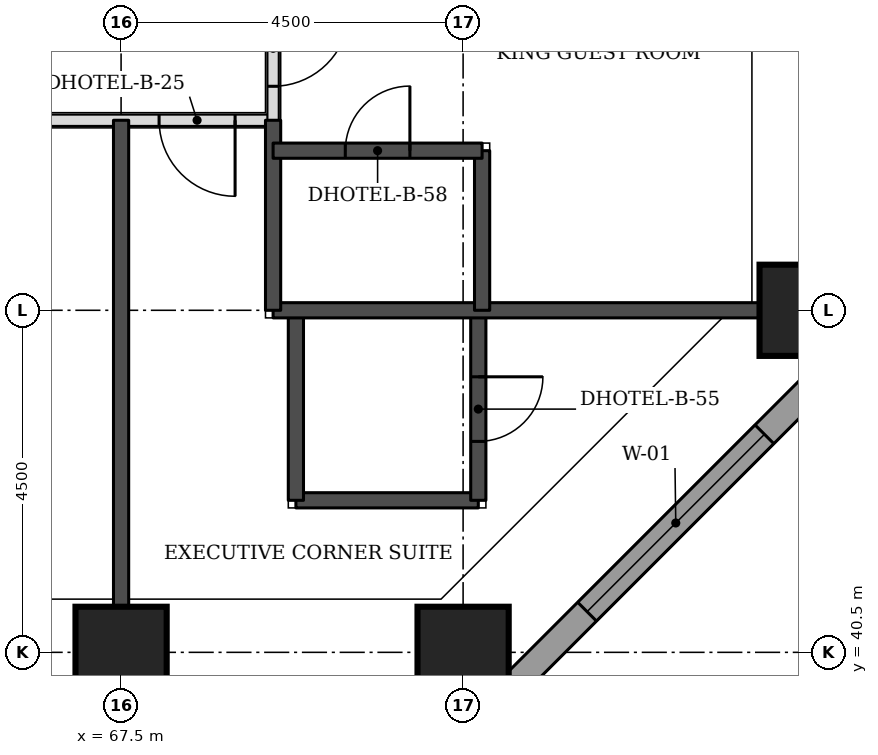
"""IFC4 building model, lengths in metres.
Left out: names, types, materials, properties, quantities, classifications, styles, units other than length and angle.
Written with IfcOpenShell. Run it as: python <this file> out.ifc"""

import sys

from ifc_helpers import new_model, si_unit, direction, frame, frame_2d, origin, origin_2d, place, context, subcontext, project, spatial, rectangle, extrude, element, fill, save


model = new_model("IFC4")
c1 = context("Model", 3, precision=1e-05, world=origin(), true_north=direction((0.0, 1.0)))
c2 = subcontext(c1, "Body", "Model", "MODEL_VIEW")
j1 = project(units=[si_unit("LENGTHUNIT", "METRE"), si_unit("PLANEANGLEUNIT", "RADIAN")], contexts=[c1])
p1 = place(None, origin())
s1 = spatial("IfcSite", under=j1, at=p1, CompositionType="ELEMENT")
p2 = place(p1, origin())
s2 = spatial("IfcBuilding", under=s1, at=p2, CompositionType="ELEMENT")
p3 = place(p2, frame((0.0, 0.0, 29.7)))
s3 = spatial("IfcBuildingStorey", under=s2, at=p3, CompositionType="ELEMENT", Elevation=29.7)
for number, where, z_axis, x_axis in (
    (1, (67.5, 40.5, 0.0), (0.0, 0.0, 1.0), (1.0, 0.0, 0.0)),
    (2, (72.0, 40.5, 0.0), (0.0, 0.0, 1.0), (1.0, 0.0, 0.0)),
    (3, (76.5, 45.0, 0.0), (0.0, 0.0, 1.0), (1.0, 0.0, 0.0)),
):
    element("IfcColumn", number, at=place(p3, frame(where, z_axis=z_axis, x_axis=x_axis)), inside=s3, PredefinedType="COLUMN", context=c2, shape_type="SweptSolid", body=[
        extrude(rectangle(XDim=1.2, YDim=1.2, at=origin_2d()), origin(), (0.0, 0.0, 1.0), 3.3),
    ])
p4 = place(p3, frame((72.27, 39.674, 0.0), z_axis=(0.0, 0.0, 1.0), x_axis=(0.707106781187, 0.707106781187, 0.0)))
e4 = element("IfcWall", 4, at=p4, inside=s3, PredefinedType="STANDARD", context=c2, shape_type="SweptSolid", body=[
    extrude(rectangle(XDim=7.151, YDim=0.35, at=frame_2d((3.576, 0.0))), origin(), (0.0, 0.0, 1.0), 3.055),
])
p5 = place(p4, frame((1.926, 0.0, 0.8)))
e5 = element("IfcOpeningElement", 5, at=p5, cuts=e4, PredefinedType="OPENING", context=c2, shape_type="SweptSolid", body=[
    extrude(rectangle(XDim=3.3, YDim=1.5, at=frame_2d((1.65, 0.75))), frame((0.0, 0.185, 0.0), z_axis=(0.0, -1.0, 0.0), x_axis=(1.0, 0.0, 0.0)), (0.0, 0.0, 1.0), 0.37),
])
p6 = place(p3, frame((52.85, 47.5, 0.0), z_axis=(0.0, 0.0, 1.0), x_axis=(1.0, 0.0, 0.0)))
e6 = element("IfcWall", 6, at=p6, inside=s3, PredefinedType="PARTITIONING", context=c2, shape_type="SweptSolid", body=[
    extrude(rectangle(XDim=16.65, YDim=0.15, at=frame_2d((8.325, 0.0))), origin(), (0.0, 0.0, 1.0), 3.08),
])
p7 = place(p6, frame((11.3, 0.0, 0.0)))
e7 = element("IfcOpeningElement", 7, at=p7, cuts=e6, PredefinedType="OPENING", context=c2, shape_type="SweptSolid", body=[
    extrude(rectangle(XDim=1.1, YDim=2.1, at=frame_2d((0.55, 1.05))), frame((0.0, 0.085, 0.0), z_axis=(0.0, -1.0, 0.0), x_axis=(1.0, 0.0, 0.0)), (0.0, 0.0, 1.0), 0.17),
])
p8 = place(p6, frame((15.15, 0.0, 0.0)))
e8 = element("IfcOpeningElement", 8, at=p8, cuts=e6, PredefinedType="OPENING", context=c2, shape_type="SweptSolid", body=[
    extrude(rectangle(XDim=1.0, YDim=2.1, at=frame_2d((0.5, 1.05))), frame((0.0, 0.085, 0.0), z_axis=(0.0, -1.0, 0.0), x_axis=(1.0, 0.0, 0.0)), (0.0, 0.0, 1.0), 0.17),
])
p9 = place(p3, frame((69.5, 47.5, 0.0), z_axis=(0.0, 0.0, 1.0), x_axis=(0.0, 1.0, 0.0)))
e9 = element("IfcWall", 9, at=p9, inside=s3, PredefinedType="PARTITIONING", context=c2, shape_type="SweptSolid", body=[
    extrude(rectangle(XDim=26.5, YDim=0.15, at=frame_2d((13.25, 0.0))), origin(), (0.0, 0.0, 1.0), 3.08),
])
p10 = place(p9, frame((24.95, 0.0, 0.0)))
e10 = element("IfcOpeningElement", 10, at=p10, cuts=e9, PredefinedType="OPENING", context=c2, shape_type="SweptSolid", body=[
    extrude(rectangle(XDim=1.0, YDim=2.1, at=frame_2d((0.5, 1.05))), frame((0.0, 0.085, 0.0), z_axis=(0.0, -1.0, 0.0), x_axis=(1.0, 0.0, 0.0)), (0.0, 0.0, 1.0), 0.17),
])
p11 = place(p9, frame((20.7, 0.0, 0.0)))
e11 = element("IfcOpeningElement", 11, at=p11, cuts=e9, PredefinedType="OPENING", context=c2, shape_type="SweptSolid", body=[
    extrude(rectangle(XDim=1.0, YDim=2.1, at=frame_2d((0.5, 1.05))), frame((0.0, 0.085, 0.0), z_axis=(0.0, -1.0, 0.0), x_axis=(1.0, 0.0, 0.0)), (0.0, 0.0, 1.0), 0.17),
])
p12 = place(p9, frame((18.55, 0.0, 0.0)))
e12 = element("IfcOpeningElement", 12, at=p12, cuts=e9, PredefinedType="OPENING", context=c2, shape_type="SweptSolid", body=[
    extrude(rectangle(XDim=1.0, YDim=2.1, at=frame_2d((0.5, 1.05))), frame((0.0, 0.085, 0.0), z_axis=(0.0, -1.0, 0.0), x_axis=(1.0, 0.0, 0.0)), (0.0, 0.0, 1.0), 0.17),
])
p13 = place(p9, frame((11.7, 0.0, 0.0)))
e13 = element("IfcOpeningElement", 13, at=p13, cuts=e9, PredefinedType="OPENING", context=c2, shape_type="SweptSolid", body=[
    extrude(rectangle(XDim=1.0, YDim=2.1, at=frame_2d((0.5, 1.05))), frame((0.0, 0.085, 0.0), z_axis=(0.0, -1.0, 0.0), x_axis=(1.0, 0.0, 0.0)), (0.0, 0.0, 1.0), 0.17),
])
p14 = place(p9, frame((7.65, 0.0, 0.0)))
e14 = element("IfcOpeningElement", 14, at=p14, cuts=e9, PredefinedType="OPENING", context=c2, shape_type="SweptSolid", body=[
    extrude(rectangle(XDim=1.1, YDim=2.1, at=frame_2d((0.55, 1.05))), frame((0.0, 0.085, 0.0), z_axis=(0.0, -1.0, 0.0), x_axis=(1.0, 0.0, 0.0)), (0.0, 0.0, 1.0), 0.17),
])
p15 = place(p9, frame((0.447, 0.0, 0.0)))
e15 = element("IfcOpeningElement", 15, at=p15, cuts=e9, PredefinedType="OPENING", context=c2, shape_type="SweptSolid", body=[
    extrude(rectangle(XDim=1.0, YDim=2.1, at=frame_2d((0.5, 1.05))), frame((0.0, 0.085, 0.0), z_axis=(0.0, -1.0, 0.0), x_axis=(1.0, 0.0, 0.0)), (0.0, 0.0, 1.0), 0.17),
])
p16 = place(p3, frame((67.5, 41.1, 0.0), z_axis=(0.0, 0.0, 1.0), x_axis=(0.0, 1.0, 0.0)))
e16 = element("IfcWall", 16, at=p16, inside=s3, PredefinedType="SOLIDWALL", context=c2, shape_type="SweptSolid", body=[
    extrude(rectangle(XDim=6.4, YDim=0.2, at=frame_2d((3.2, 0.0))), origin(), (0.0, 0.0, 1.0), 3.08),
])
p17 = place(p3, frame((69.8, 42.5, 0.0), z_axis=(0.0, 0.0, 1.0), x_axis=(1.0, 0.0, 0.0)))
e17 = element("IfcWall", 17, at=p17, inside=s3, PredefinedType="SOLIDWALL", context=c2, shape_type="SweptSolid", body=[
    extrude(rectangle(XDim=2.4, YDim=0.2, at=frame_2d((1.2, 0.0))), origin(), (0.0, 0.0, 1.0), 3.08),
])
p18 = place(p3, frame((69.8, 42.5, 0.0), z_axis=(0.0, 0.0, 1.0), x_axis=(0.0, 1.0, 0.0)))
e18 = element("IfcWall", 18, at=p18, inside=s3, PredefinedType="SOLIDWALL", context=c2, shape_type="SweptSolid", body=[
    extrude(rectangle(XDim=2.5, YDim=0.2, at=frame_2d((1.25, 0.0))), origin(), (0.0, 0.0, 1.0), 3.08),
])
p19 = place(p3, frame((72.2, 42.5, 0.0), z_axis=(0.0, 0.0, 1.0), x_axis=(0.0, 1.0, 0.0)))
e19 = element("IfcWall", 19, at=p19, inside=s3, PredefinedType="SOLIDWALL", context=c2, shape_type="SweptSolid", body=[
    extrude(rectangle(XDim=2.5, YDim=0.2, at=frame_2d((1.25, 0.0))), origin(), (0.0, 0.0, 1.0), 3.08),
])
p20 = place(p19, frame((0.775, 0.0, 0.0)))
e20 = element("IfcOpeningElement", 20, at=p20, cuts=e19, PredefinedType="OPENING", context=c2, shape_type="SweptSolid", body=[
    extrude(rectangle(XDim=0.85, YDim=2.1, at=frame_2d((0.425, 1.05))), frame((0.0, 0.11, 0.0), z_axis=(0.0, -1.0, 0.0), x_axis=(1.0, 0.0, 0.0)), (0.0, 0.0, 1.0), 0.22),
])
p21 = place(p3, frame((69.5, 45.0, 0.0), z_axis=(0.0, 0.0, 1.0), x_axis=(1.0, 0.0, 0.0)))
e21 = element("IfcWall", 21, at=p21, inside=s3, PredefinedType="SOLIDWALL", context=c2, shape_type="SweptSolid", body=[
    extrude(rectangle(XDim=6.4, YDim=0.2, at=frame_2d((3.2, 0.0))), origin(), (0.0, 0.0, 1.0), 3.08),
])
p22 = place(p3, frame((69.5, 45.0, 0.0), z_axis=(0.0, 0.0, 1.0), x_axis=(0.0, 1.0, 0.0)))
e22 = element("IfcWall", 22, at=p22, inside=s3, PredefinedType="SOLIDWALL", context=c2, shape_type="SweptSolid", body=[
    extrude(rectangle(XDim=2.5, YDim=0.2, at=frame_2d((1.25, 0.0))), origin(), (0.0, 0.0, 1.0), 3.08),
])
p23 = place(p3, frame((72.25, 45.0, 0.0), z_axis=(0.0, 0.0, 1.0), x_axis=(0.0, 1.0, 0.0)))
e23 = element("IfcWall", 23, at=p23, inside=s3, PredefinedType="SOLIDWALL", context=c2, shape_type="SweptSolid", body=[
    extrude(rectangle(XDim=2.1, YDim=0.2, at=frame_2d((1.05, 0.0))), origin(), (0.0, 0.0, 1.0), 3.08),
])
p24 = place(p3, frame((69.5, 47.1, 0.0), z_axis=(0.0, 0.0, 1.0), x_axis=(1.0, 0.0, 0.0)))
e24 = element("IfcWall", 24, at=p24, inside=s3, PredefinedType="SOLIDWALL", context=c2, shape_type="SweptSolid", body=[
    extrude(rectangle(XDim=2.75, YDim=0.2, at=frame_2d((1.375, 0.0))), origin(), (0.0, 0.0, 1.0), 3.08),
])
p25 = place(p24, frame((0.95, 0.0, 0.0)))
e25 = element("IfcOpeningElement", 25, at=p25, cuts=e24, PredefinedType="OPENING", context=c2, shape_type="SweptSolid", body=[
    extrude(rectangle(XDim=0.85, YDim=2.1, at=frame_2d((0.425, 1.05))), frame((0.0, 0.11, 0.0), z_axis=(0.0, -1.0, 0.0), x_axis=(1.0, 0.0, 0.0)), (0.0, 0.0, 1.0), 0.22),
])
p26 = place(p5, origin())
e26 = element("IfcWindow", 26, at=p26, inside=s3, PartitioningType="SINGLE_PANEL", PredefinedType="WINDOW", context=c2, shape_type="SweptSolid", body=[
    extrude(rectangle(XDim=3.3, YDim=1.5, at=frame_2d((1.65, 0.75))), frame((0.0, 0.085, 0.0), z_axis=(0.0, -1.0, 0.0), x_axis=(1.0, 0.0, 0.0)), (0.0, 0.0, 1.0), 0.06),
])
fill(e5, e26)
p27 = place(p15, frame((1.0, 0.0, 0.0), z_axis=(0.0, 0.0, 1.0), x_axis=(-1.0, 0.0, 0.0)))
e27 = element("IfcDoor", 27, at=p27, inside=s3, OperationType="SINGLE_SWING_LEFT", PredefinedType="DOOR", context=c2, shape_type="SweptSolid", body=[
    extrude(rectangle(XDim=1.0, YDim=2.1, at=frame_2d((0.5, 1.05))), frame((0.0, 0.025, 0.0), z_axis=(0.0, -1.0, 0.0), x_axis=(1.0, 0.0, 0.0)), (0.0, 0.0, 1.0), 0.05),
])
fill(e15, e27)
p28 = place(p25, origin())
e28 = element("IfcDoor", 28, at=p28, inside=s3, OperationType="SINGLE_SWING_RIGHT", PredefinedType="DOOR", context=c2, shape_type="SweptSolid", body=[
    extrude(rectangle(XDim=0.85, YDim=2.1, at=frame_2d((0.425, 1.05))), frame((0.0, 0.025, 0.0), z_axis=(0.0, -1.0, 0.0), x_axis=(1.0, 0.0, 0.0)), (0.0, 0.0, 1.0), 0.05),
])
fill(e25, e28)
p29 = place(p8, frame((1.0, 0.0, 0.0), z_axis=(0.0, 0.0, 1.0), x_axis=(-1.0, 0.0, 0.0)))
e29 = element("IfcDoor", 29, at=p29, inside=s3, OperationType="SINGLE_SWING_LEFT", PredefinedType="DOOR", context=c2, shape_type="SweptSolid", body=[
    extrude(rectangle(XDim=1.0, YDim=2.1, at=frame_2d((0.5, 1.05))), frame((0.0, 0.025, 0.0), z_axis=(0.0, -1.0, 0.0), x_axis=(1.0, 0.0, 0.0)), (0.0, 0.0, 1.0), 0.05),
])
fill(e8, e29)
p30 = place(p20, frame((0.85, 0.0, 0.0), z_axis=(0.0, 0.0, 1.0), x_axis=(-1.0, 0.0, 0.0)))
e30 = element("IfcDoor", 30, at=p30, inside=s3, OperationType="SINGLE_SWING_LEFT", PredefinedType="DOOR", context=c2, shape_type="SweptSolid", body=[
    extrude(rectangle(XDim=0.85, YDim=2.1, at=frame_2d((0.425, 1.05))), frame((0.0, 0.025, 0.0), z_axis=(0.0, -1.0, 0.0), x_axis=(1.0, 0.0, 0.0)), (0.0, 0.0, 1.0), 0.05),
])
fill(e20, e30)
save(model, sys.argv[1])
